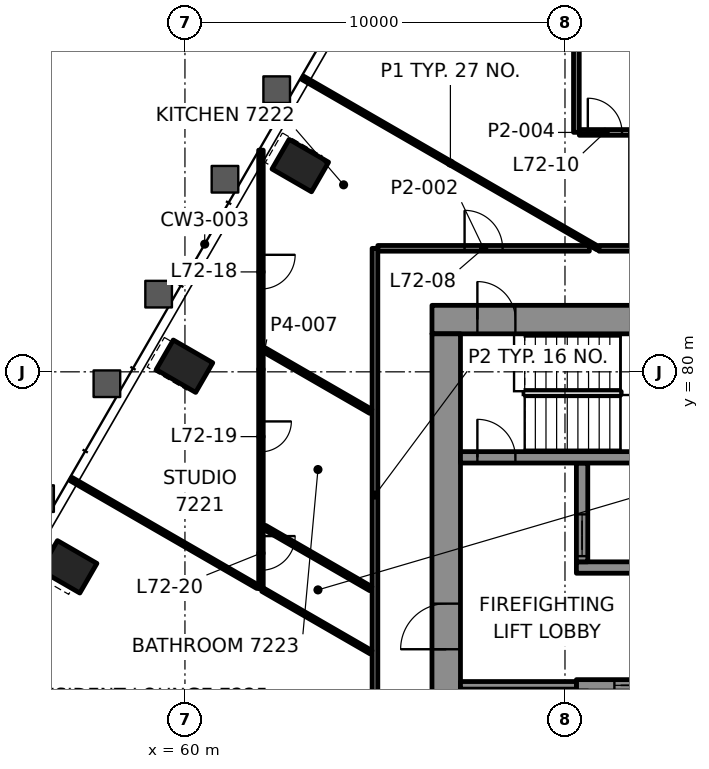
"""IFC4 building model, lengths in metres.
Left out: names, types, materials, properties, quantities, classifications, styles, units other than length and angle.
Written with IfcOpenShell. Run it as: python <this file> out.ifc"""

import sys

from ifc_helpers import new_model, si_unit, direction, frame, frame_2d, origin, origin_2d, place, context, subcontext, project, spatial, rectangle, hollow_rectangle, extrude, element, fill, save


model = new_model("IFC4")
c1 = context("Model", 3, precision=1e-05, world=origin(), true_north=direction((0.0, 1.0)))
c2 = subcontext(c1, "Body", "Model", "MODEL_VIEW")
j1 = project(units=[si_unit("LENGTHUNIT", "METRE"), si_unit("PLANEANGLEUNIT", "RADIAN")], contexts=[c1])
p1 = place(None, origin())
s1 = spatial("IfcSite", under=j1, at=p1, CompositionType="ELEMENT")
p2 = place(p1, origin())
s2 = spatial("IfcBuilding", under=s1, at=p2, CompositionType="ELEMENT")
p3 = place(p2, frame((0.0, 0.0, 298.6)))
s3 = spatial("IfcBuildingStorey", under=s2, at=p3, CompositionType="ELEMENT", Elevation=298.6)
for number, where, z_axis, x_axis in (
    (1, (63.035, 85.427, -0.0), (0.0, 0.0, 1.0), (-0.5, -0.866, 0.0)),
    (2, (59.987, 80.148, -0.0), (0.0, 0.0, 1.0), (-0.5, -0.866, 0.0)),
    (3, (56.939, 74.869, -0.0), (0.0, 0.0, 1.0), (-0.5, -0.866, 0.0)),
):
    element("IfcColumn", number, at=place(p3, frame(where, z_axis=z_axis, x_axis=x_axis)), inside=s3, PredefinedType="COLUMN", context=c2, shape_type="SweptSolid", body=[
        extrude(hollow_rectangle(XDim=0.9, YDim=1.2, WallThickness=0.06, at=origin_2d()), origin(), (0.0, 0.0, 1.0), 3.5),
    ])
p4 = place(p3, frame((66.5, 81.375, 0.0), z_axis=(0.0, 0.0, 1.0), x_axis=(1.0, 0.0, 0.0)))
e4 = element("IfcWall", 4, at=p4, inside=s3, PredefinedType="SHEAR", context=c2, shape_type="SweptSolid", body=[
    extrude(rectangle(XDim=17.0, YDim=0.75, at=frame_2d((8.5, 0.0))), origin(), (0.0, 0.0, 1.0), 3.3),
])
p5 = place(p4, frame((1.195, 0.0, 0.0)))
e5 = element("IfcOpeningElement", 5, at=p5, cuts=e4, PredefinedType="OPENING", context=c2, shape_type="SweptSolid", body=[
    extrude(rectangle(XDim=1.0, YDim=2.1, at=frame_2d((0.5, 1.05))), frame((0.0, 0.385, 0.0), z_axis=(0.0, -1.0, 0.0), x_axis=(1.0, 0.0, 0.0)), (0.0, 0.0, 1.0), 0.77),
])
p6 = place(p4, frame((15.005, 0.0, 0.0)))
e6 = element("IfcOpeningElement", 6, at=p6, cuts=e4, PredefinedType="OPENING", context=c2, shape_type="SweptSolid", body=[
    extrude(rectangle(XDim=1.0, YDim=2.1, at=frame_2d((0.5, 1.05))), frame((0.0, 0.385, 0.0), z_axis=(0.0, -1.0, 0.0), x_axis=(1.0, 0.0, 0.0)), (0.0, 0.0, 1.0), 0.77),
])
p7 = place(p4, frame((8.15, 0.0, 0.0)))
e7 = element("IfcOpeningElement", 7, at=p7, cuts=e4, PredefinedType="OPENING", context=c2, shape_type="SweptSolid", body=[
    extrude(rectangle(XDim=0.9, YDim=2.1, at=frame_2d((0.45, 1.05))), frame((0.0, 0.385, 0.0), z_axis=(0.0, -1.0, 0.0), x_axis=(1.0, 0.0, 0.0)), (0.0, 0.0, 1.0), 0.77),
])
p8 = place(p3, frame((66.875, 69.0, 0.0), z_axis=(0.0, 0.0, 1.0), x_axis=(0.0, 1.0, 0.0)))
e8 = element("IfcWall", 8, at=p8, inside=s3, PredefinedType="SHEAR", context=c2, shape_type="SweptSolid", body=[
    extrude(rectangle(XDim=12.0, YDim=0.75, at=frame_2d((6.0, 0.0))), origin(), (0.0, 0.0, 1.0), 3.3),
])
p9 = place(p8, frame((3.7, 0.0, 0.0)))
e9 = element("IfcOpeningElement", 9, at=p9, cuts=e8, PredefinedType="OPENING", context=c2, shape_type="SweptSolid", body=[
    extrude(rectangle(XDim=1.2, YDim=2.1, at=frame_2d((0.6, 1.05))), frame((0.0, 0.385, 0.0), z_axis=(0.0, -1.0, 0.0), x_axis=(1.0, 0.0, 0.0)), (0.0, 0.0, 1.0), 0.77),
])
p10 = place(p3, frame((70.3, 71.75, 0.0), z_axis=(0.0, 0.0, 1.0), x_axis=(1.0, 0.0, 0.0)))
e10 = element("IfcWall", 10, at=p10, inside=s3, PredefinedType="SHEAR", context=c2, shape_type="SweptSolid", body=[
    extrude(rectangle(XDim=11.5, YDim=0.3, at=frame_2d((5.75, 0.0))), origin(), (0.0, 0.0, 1.0), 3.3),
])
p11 = place(p10, frame((1.0, 0.0, 0.0)))
e11 = element("IfcOpeningElement", 11, at=p11, cuts=e10, PredefinedType="OPENING", context=c2, shape_type="SweptSolid", body=[
    extrude(rectangle(XDim=1.1, YDim=2.1, at=frame_2d((0.55, 1.05))), frame((0.0, 0.16, 0.0), z_axis=(0.0, -1.0, 0.0), x_axis=(1.0, 0.0, 0.0)), (0.0, 0.0, 1.0), 0.32),
])
p12 = place(p10, frame((3.8, 0.0, 0.0)))
e12 = element("IfcOpeningElement", 12, at=p12, cuts=e10, PredefinedType="OPENING", context=c2, shape_type="SweptSolid", body=[
    extrude(rectangle(XDim=1.1, YDim=2.1, at=frame_2d((0.55, 1.05))), frame((0.0, 0.16, 0.0), z_axis=(0.0, -1.0, 0.0), x_axis=(1.0, 0.0, 0.0)), (0.0, 0.0, 1.0), 0.32),
])
p13 = place(p10, frame((6.6, 0.0, 0.0)))
e13 = element("IfcOpeningElement", 13, at=p13, cuts=e10, PredefinedType="OPENING", context=c2, shape_type="SweptSolid", body=[
    extrude(rectangle(XDim=1.1, YDim=2.1, at=frame_2d((0.55, 1.05))), frame((0.0, 0.16, 0.0), z_axis=(0.0, -1.0, 0.0), x_axis=(1.0, 0.0, 0.0)), (0.0, 0.0, 1.0), 0.32),
])
p14 = place(p10, frame((9.4, 0.0, 0.0)))
e14 = element("IfcOpeningElement", 14, at=p14, cuts=e10, PredefinedType="OPENING", context=c2, shape_type="SweptSolid", body=[
    extrude(rectangle(XDim=1.1, YDim=2.1, at=frame_2d((0.55, 1.05))), frame((0.0, 0.16, 0.0), z_axis=(0.0, -1.0, 0.0), x_axis=(1.0, 0.0, 0.0)), (0.0, 0.0, 1.0), 0.32),
])
p15 = place(p3, frame((70.3, 74.85, 0.0), z_axis=(0.0, 0.0, 1.0), x_axis=(1.0, 0.0, 0.0)))
e15 = element("IfcWall", 15, at=p15, inside=s3, PredefinedType="SHEAR", context=c2, shape_type="SweptSolid", body=[
    extrude(rectangle(XDim=5.9, YDim=0.3, at=frame_2d((2.95, 0.0))), origin(), (0.0, 0.0, 1.0), 3.3),
])
p16 = place(p15, frame((3.8, 0.0, 0.0)))
e16 = element("IfcOpeningElement", 16, at=p16, cuts=e15, PredefinedType="OPENING", context=c2, shape_type="SweptSolid", body=[
    extrude(rectangle(XDim=1.1, YDim=2.1, at=frame_2d((0.55, 1.05))), frame((0.0, 0.16, 0.0), z_axis=(0.0, -1.0, 0.0), x_axis=(1.0, 0.0, 0.0)), (0.0, 0.0, 1.0), 0.32),
])
p17 = place(p3, frame((70.45, 75.0, 0.0), z_axis=(0.0, 0.0, 1.0), x_axis=(0.0, 1.0, 0.0)))
e17 = element("IfcWall", 17, at=p17, inside=s3, PredefinedType="SHEAR", context=c2, shape_type="SweptSolid", body=[
    extrude(rectangle(XDim=2.6, YDim=0.3, at=frame_2d((1.3, 0.0))), origin(), (0.0, 0.0, 1.0), 3.3),
])
p18 = place(p17, frame((0.15, 0.0, 0.0)))
e18 = element("IfcOpeningElement", 18, at=p18, cuts=e17, PredefinedType="OPENING", context=c2, shape_type="SweptSolid", body=[
    extrude(rectangle(XDim=1.1, YDim=2.1, at=frame_2d((0.55, 1.05))), frame((0.0, 0.16, 0.0), z_axis=(0.0, -1.0, 0.0), x_axis=(1.0, 0.0, 0.0)), (0.0, 0.0, 1.0), 0.32),
])
p19 = place(p3, frame((67.25, 77.75, 0.0), z_axis=(0.0, 0.0, 1.0), x_axis=(1.0, 0.0, 0.0)))
e19 = element("IfcWall", 19, at=p19, inside=s3, PredefinedType="SHEAR", context=c2, shape_type="SweptSolid", body=[
    extrude(rectangle(XDim=15.5, YDim=0.3, at=frame_2d((7.75, 0.0))), origin(), (0.0, 0.0, 1.0), 3.3),
])
p20 = place(p19, frame((0.445, 0.0, 0.0)))
e20 = element("IfcOpeningElement", 20, at=p20, cuts=e19, PredefinedType="OPENING", context=c2, shape_type="SweptSolid", body=[
    extrude(rectangle(XDim=1.0, YDim=2.1, at=frame_2d((0.5, 1.05))), frame((0.0, 0.16, 0.0), z_axis=(0.0, -1.0, 0.0), x_axis=(1.0, 0.0, 0.0)), (0.0, 0.0, 1.0), 0.32),
])
p21 = place(p3, frame((65.075, 83.25, 0.0), z_axis=(0.0, 0.0, 1.0), x_axis=(1.0, 0.0, 0.0)))
e21 = element("IfcWall", 21, at=p21, inside=s3, PredefinedType="PARTITIONING", context=c2, shape_type="SweptSolid", body=[
    extrude(rectangle(XDim=5.565, YDim=0.15, at=frame_2d((2.783, 0.0))), origin(), (0.0, 0.0, 1.0), 2.7),
])
p22 = place(p21, frame((2.283, 0.0, 0.0)))
e22 = element("IfcOpeningElement", 22, at=p22, cuts=e21, PredefinedType="OPENING", context=c2, shape_type="SweptSolid", body=[
    extrude(rectangle(XDim=1.0, YDim=2.1, at=frame_2d((0.5, 1.05))), frame((0.0, 0.085, 0.0), z_axis=(0.0, -1.0, 0.0), x_axis=(1.0, 0.0, 0.0)), (0.0, 0.0, 1.0), 0.17),
])
p23 = place(p3, frame((70.377, 86.3, 0.0), z_axis=(0.0, 0.0, 1.0), x_axis=(1.0, 0.0, 0.0)))
e23 = element("IfcWall", 23, at=p23, inside=s3, PredefinedType="PARTITIONING", context=c2, shape_type="SweptSolid", body=[
    extrude(rectangle(XDim=1.348, YDim=0.15, at=frame_2d((0.674, 0.0))), origin(), (0.0, 0.0, 1.0), 2.7),
])
p24 = place(p23, frame((0.224, 0.0, 0.0)))
e24 = element("IfcOpeningElement", 24, at=p24, cuts=e23, PredefinedType="OPENING", context=c2, shape_type="SweptSolid", body=[
    extrude(rectangle(XDim=0.9, YDim=2.1, at=frame_2d((0.45, 1.05))), frame((0.0, 0.085, 0.0), z_axis=(0.0, -1.0, 0.0), x_axis=(1.0, 0.0, 0.0)), (0.0, 0.0, 1.0), 0.17),
])
p25 = place(p3, frame((70.3, 86.302, 0.0), z_axis=(0.0, 0.0, 1.0), x_axis=(0.0, 1.0, 0.0)))
e25 = element("IfcWall", 25, at=p25, inside=s3, PredefinedType="PARTITIONING", context=c2, shape_type="SweptSolid", body=[
    extrude(rectangle(XDim=9.796, YDim=0.15, at=frame_2d((4.898, 0.0))), origin(), (0.0, 0.0, 1.0), 2.7),
])
p26 = place(p3, frame((65.0, 70.266, 0.0), z_axis=(0.0, 0.0, 1.0), x_axis=(0.0, 1.0, 0.0)))
e26 = element("IfcWall", 26, at=p26, inside=s3, PredefinedType="PARTITIONING", context=c2, shape_type="SweptSolid", body=[
    extrude(rectangle(XDim=12.984, YDim=0.15, at=frame_2d((6.492, 0.0))), origin(), (0.0, 0.0, 1.0), 2.7),
])
p27 = place(p3, frame((62.0, 85.834, 0.0), z_axis=(0.0, 0.0, 1.0), x_axis=(0.0, -1.0, 0.0)))
e27 = element("IfcWall", 27, at=p27, inside=s3, PredefinedType="PARTITIONING", context=c2, shape_type="SweptSolid", body=[
    extrude(rectangle(XDim=11.541, YDim=0.12, at=frame_2d((5.771, 0.0))), origin(), (0.0, 0.0, 1.0), 2.688),
])
p28 = place(p27, frame((2.754, 0.0, 0.0)))
e28 = element("IfcOpeningElement", 28, at=p28, cuts=e27, PredefinedType="OPENING", context=c2, shape_type="SweptSolid", body=[
    extrude(rectangle(XDim=0.9, YDim=2.1, at=frame_2d((0.45, 1.05))), frame((0.0, 0.07, 0.0), z_axis=(0.0, -1.0, 0.0), x_axis=(1.0, 0.0, 0.0)), (0.0, 0.0, 1.0), 0.14),
])
p29 = place(p27, frame((7.139, 0.0, 0.0)))
e29 = element("IfcOpeningElement", 29, at=p29, cuts=e27, PredefinedType="OPENING", context=c2, shape_type="SweptSolid", body=[
    extrude(rectangle(XDim=0.8, YDim=2.1, at=frame_2d((0.4, 1.05))), frame((0.0, 0.07, 0.0), z_axis=(0.0, -1.0, 0.0), x_axis=(1.0, 0.0, 0.0)), (0.0, 0.0, 1.0), 0.14),
])
p30 = place(p27, frame((10.156, 0.0, 0.0)))
e30 = element("IfcOpeningElement", 30, at=p30, cuts=e27, PredefinedType="OPENING", context=c2, shape_type="SweptSolid", body=[
    extrude(rectangle(XDim=0.9, YDim=2.1, at=frame_2d((0.45, 1.05))), frame((0.0, 0.07, 0.0), z_axis=(0.0, -1.0, 0.0), x_axis=(1.0, 0.0, 0.0)), (0.0, 0.0, 1.0), 0.14),
])
p31 = place(p3, frame((70.871, 83.25, 0.0), z_axis=(0.0, 0.0, 1.0), x_axis=(-0.866022943116, 0.500004261978, 0.0)))
e31 = element("IfcWall", 31, at=p31, inside=s3, PredefinedType="PARTITIONING", context=c2, shape_type="SweptSolid", body=[
    extrude(rectangle(XDim=8.974, YDim=0.1, at=frame_2d((4.487, 0.0))), origin(), (0.0, 0.0, 1.0), 2.688),
])
for number, where, z_axis, x_axis in (
    (32, (64.89, 78.959, 0.0), (0.0, 0.0, 1.0), (-0.866, 0.5, 0.0)),
    (33, (64.89, 74.293, 0.0), (0.0, 0.0, 1.0), (-0.866, 0.5, 0.0)),
):
    element("IfcWall", number, at=place(p3, frame(where, z_axis=z_axis, x_axis=x_axis)), inside=s3, PredefinedType="PARTITIONING", context=c2, shape_type="SweptSolid", body=[
        extrude(rectangle(XDim=3.228, YDim=0.12, at=frame_2d((1.614, 0.0))), origin(), (0.0, 0.0, 1.0), 2.7),
    ])
p32 = place(p3, frame((64.899, 72.62, 0.0), z_axis=(0.0, 0.0, 1.0), x_axis=(-0.866032610133, 0.499987518031, 0.0)))
e34 = element("IfcWall", 34, at=p32, inside=s3, PredefinedType="PARTITIONING", context=c2, shape_type="SweptSolid", body=[
    extrude(rectangle(XDim=3.295, YDim=0.1, at=frame_2d((1.648, 0.0))), origin(), (0.0, 0.0, 1.0), 2.7),
])
p33 = place(p3, frame((70.896, 83.25, 0.0), z_axis=(0.0, 0.0, 1.0), x_axis=(1.0, 0.0, 0.0)))
e35 = element("IfcWall", 35, at=p33, inside=s3, PredefinedType="PARTITIONING", context=c2, shape_type="SweptSolid", body=[
    extrude(rectangle(XDim=0.905, YDim=0.15, at=frame_2d((0.452, 0.0))), origin(), (0.0, 0.0, 1.0), 2.7),
])
p34 = place(p3, frame((61.915, 74.343, 0.0), z_axis=(0.0, 0.0, 1.0), x_axis=(-0.866030760678, 0.499990721473, 0.0)))
e36 = element("IfcWall", 36, at=p34, inside=s3, PredefinedType="PARTITIONING", context=c2, shape_type="SweptSolid", body=[
    extrude(rectangle(XDim=5.672, YDim=0.1, at=frame_2d((2.836, 0.0))), origin(), (0.0, 0.0, 1.0), 2.688),
])
p35 = place(p3, frame((67.25, 71.75, 0.0), z_axis=(0.0, 0.0, 1.0), x_axis=(1.0, 0.0, 0.0)))
e37 = element("IfcWall", 37, at=p35, inside=s3, PredefinedType="PARTITIONING", context=c2, shape_type="SweptSolid", body=[
    extrude(rectangle(XDim=3.05, YDim=0.2, at=frame_2d((1.525, 0.0))), origin(), (0.0, 0.0, 1.0), 3.3),
])
p36 = place(p22, origin())
e38 = element("IfcDoor", 38, at=p36, inside=s3, OperationType="SINGLE_SWING_RIGHT", PredefinedType="DOOR", context=c2, shape_type="SweptSolid", body=[
    extrude(rectangle(XDim=1.0, YDim=2.1, at=frame_2d((0.5, 1.05))), frame((0.0, 0.025, 0.0), z_axis=(0.0, -1.0, 0.0), x_axis=(1.0, 0.0, 0.0)), (0.0, 0.0, 1.0), 0.05),
])
fill(e22, e38)
p37 = place(p24, origin())
e39 = element("IfcDoor", 39, at=p37, inside=s3, OperationType="SINGLE_SWING_LEFT", PredefinedType="DOOR", context=c2, shape_type="SweptSolid", body=[
    extrude(rectangle(XDim=0.9, YDim=2.1, at=frame_2d((0.45, 1.05))), frame((0.0, 0.025, 0.0), z_axis=(0.0, -1.0, 0.0), x_axis=(1.0, 0.0, 0.0)), (0.0, 0.0, 1.0), 0.05),
])
fill(e24, e39)
p38 = place(p28, origin())
e40 = element("IfcDoor", 40, at=p38, inside=s3, OperationType="SINGLE_SWING_RIGHT", PredefinedType="DOOR", context=c2, shape_type="SweptSolid", body=[
    extrude(rectangle(XDim=0.9, YDim=2.1, at=frame_2d((0.45, 1.05))), frame((0.0, 0.025, 0.0), z_axis=(0.0, -1.0, 0.0), x_axis=(1.0, 0.0, 0.0)), (0.0, 0.0, 1.0), 0.05),
])
fill(e28, e40)
p39 = place(p29, origin())
e41 = element("IfcDoor", 41, at=p39, inside=s3, OperationType="SINGLE_SWING_RIGHT", PredefinedType="DOOR", context=c2, shape_type="SweptSolid", body=[
    extrude(rectangle(XDim=0.8, YDim=2.1, at=frame_2d((0.4, 1.05))), frame((0.0, 0.025, 0.0), z_axis=(0.0, -1.0, 0.0), x_axis=(1.0, 0.0, 0.0)), (0.0, 0.0, 1.0), 0.05),
])
fill(e29, e41)
p40 = place(p30, origin())
e42 = element("IfcDoor", 42, at=p40, inside=s3, OperationType="SINGLE_SWING_LEFT", PredefinedType="DOOR", context=c2, shape_type="SweptSolid", body=[
    extrude(rectangle(XDim=0.9, YDim=2.1, at=frame_2d((0.45, 1.05))), frame((0.0, 0.025, 0.0), z_axis=(0.0, -1.0, 0.0), x_axis=(1.0, 0.0, 0.0)), (0.0, 0.0, 1.0), 0.05),
])
fill(e30, e42)
p41 = place(p11, origin())
e43 = element("IfcDoor", 43, at=p41, inside=s3, OperationType="DOUBLE_DOOR_SLIDING", PredefinedType="DOOR", context=c2, shape_type="SweptSolid", body=[
    extrude(rectangle(XDim=1.1, YDim=2.1, at=frame_2d((0.55, 1.05))), frame((0.0, 0.025, 0.0), z_axis=(0.0, -1.0, 0.0), x_axis=(1.0, 0.0, 0.0)), (0.0, 0.0, 1.0), 0.05),
])
fill(e11, e43)
p42 = place(p18, origin())
e44 = element("IfcDoor", 44, at=p42, inside=s3, OperationType="DOUBLE_DOOR_SLIDING", PredefinedType="DOOR", context=c2, shape_type="SweptSolid", body=[
    extrude(rectangle(XDim=1.1, YDim=2.1, at=frame_2d((0.55, 1.05))), frame((0.0, 0.025, 0.0), z_axis=(0.0, -1.0, 0.0), x_axis=(1.0, 0.0, 0.0)), (0.0, 0.0, 1.0), 0.05),
])
fill(e18, e44)
p43 = place(p20, origin())
e45 = element("IfcDoor", 45, at=p43, inside=s3, OperationType="SINGLE_SWING_LEFT", PredefinedType="DOOR", context=c2, shape_type="SweptSolid", body=[
    extrude(rectangle(XDim=1.0, YDim=2.1, at=frame_2d((0.5, 1.05))), frame((0.0, 0.025, 0.0), z_axis=(0.0, -1.0, 0.0), x_axis=(1.0, 0.0, 0.0)), (0.0, 0.0, 1.0), 0.05),
])
fill(e20, e45)
p44 = place(p5, origin())
e46 = element("IfcDoor", 46, at=p44, inside=s3, OperationType="SINGLE_SWING_RIGHT", PredefinedType="DOOR", context=c2, shape_type="SweptSolid", body=[
    extrude(rectangle(XDim=1.0, YDim=2.1, at=frame_2d((0.5, 1.05))), frame((0.0, 0.095, 0.0), z_axis=(0.0, -1.0, 0.0), x_axis=(1.0, 0.0, 0.0)), (0.0, 0.0, 1.0), 0.19),
])
fill(e5, e46)
p45 = place(p9, origin())
e47 = element("IfcDoor", 47, at=p45, inside=s3, OperationType="SINGLE_SWING_RIGHT", PredefinedType="DOOR", context=c2, shape_type="SweptSolid", body=[
    extrude(rectangle(XDim=1.2, YDim=2.1, at=frame_2d((0.6, 1.05))), frame((0.0, 0.095, 0.0), z_axis=(0.0, -1.0, 0.0), x_axis=(1.0, 0.0, 0.0)), (0.0, 0.0, 1.0), 0.19),
])
fill(e9, e47)
save(model, sys.argv[1])
